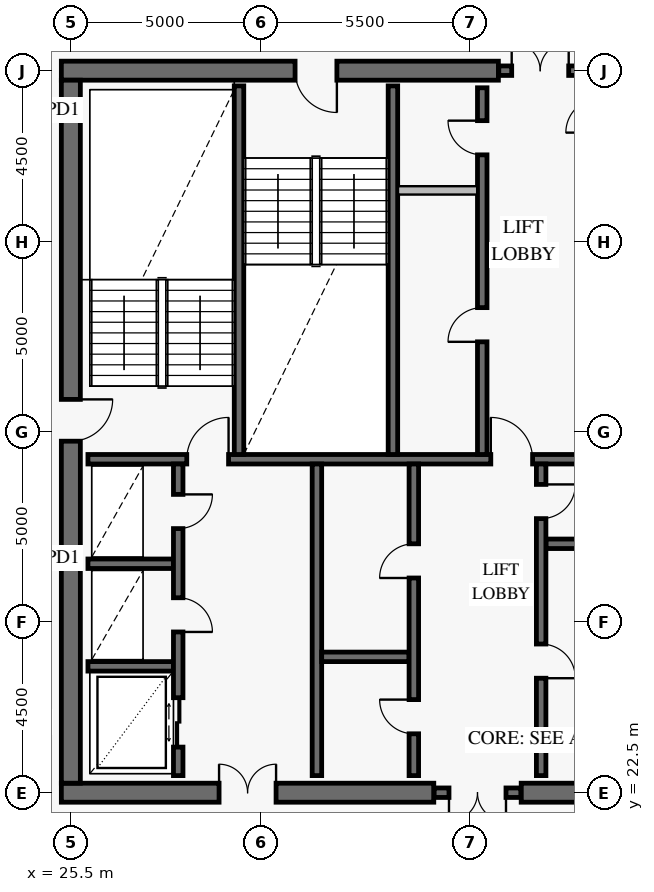
"""IFC4 building model, lengths in metres.
Left out: names, types, materials, properties, quantities, classifications, styles, units other than length and angle.
Written with IfcOpenShell. Run it as: python <this file> out.ifc"""

import sys

from ifc_helpers import new_model, si_unit, direction, frame, frame_2d, origin, place, context, subcontext, project, spatial, rectangle, extrude, element, fill, save


model = new_model("IFC4")
c1 = context("Model", 3, precision=1e-05, world=origin(), true_north=direction((0.0, 1.0)))
c2 = subcontext(c1, "Body", "Model", "MODEL_VIEW")
j1 = project(units=[si_unit("LENGTHUNIT", "METRE"), si_unit("PLANEANGLEUNIT", "RADIAN")], contexts=[c1])
p1 = place(None, origin())
s1 = spatial("IfcSite", under=j1, at=p1, CompositionType="ELEMENT")
p2 = place(p1, origin())
s2 = spatial("IfcBuilding", under=s1, at=p2, CompositionType="ELEMENT")
p3 = place(p2, frame((0.0, 0.0, 319.6)))
s3 = spatial("IfcBuildingStorey", under=s2, at=p3, CompositionType="ELEMENT", Elevation=319.6)
p4 = place(p3, frame((25.25, 22.5, 0.0), z_axis=(0.0, 0.0, 1.0), x_axis=(1.0, 0.0, 0.0)))
e1 = element("IfcWall", 1, at=p4, inside=s3, PredefinedType="SHEAR", context=c2, shape_type="SweptSolid", body=[
    extrude(rectangle(XDim=9.8, YDim=0.5, at=frame_2d((4.9, 0.0))), origin(), (0.0, 0.0, 1.0), 3.8),
])
p5 = place(p4, frame((4.15, 0.0, 0.0)))
e2 = element("IfcOpeningElement", 2, at=p5, cuts=e1, PredefinedType="OPENING", context=c2, shape_type="SweptSolid", body=[
    extrude(rectangle(XDim=1.5, YDim=2.15, at=frame_2d((0.75, 1.075))), frame((0.0, 0.262, 0.0), z_axis=(0.0, -1.0, 0.0), x_axis=(1.0, 0.0, 0.0)), (0.0, 0.0, 1.0), 0.524),
])
p6 = place(p3, frame((37.35, 22.5, 0.0), z_axis=(0.0, 0.0, 1.0), x_axis=(1.0, 0.0, 0.0)))
e3 = element("IfcWall", 3, at=p6, inside=s3, PredefinedType="SHEAR", context=c2, shape_type="SweptSolid", body=[
    extrude(rectangle(XDim=9.4, YDim=0.5, at=frame_2d((4.7, 0.0))), origin(), (0.0, 0.0, 1.0), 3.8),
])
p7 = place(p6, frame((3.95, 0.0, 0.0)))
e4 = element("IfcOpeningElement", 4, at=p7, cuts=e3, PredefinedType="OPENING", context=c2, shape_type="SweptSolid", body=[
    extrude(rectangle(XDim=1.5, YDim=2.15, at=frame_2d((0.75, 1.075))), frame((0.0, 0.262, 0.0), z_axis=(0.0, -1.0, 0.0), x_axis=(1.0, 0.0, 0.0)), (0.0, 0.0, 1.0), 0.524),
])
p8 = place(p3, frame((36.75, 41.5, 0.0), z_axis=(0.0, 0.0, 1.0), x_axis=(-1.0, 0.0, 0.0)))
e5 = element("IfcWall", 5, at=p8, inside=s3, PredefinedType="SHEAR", context=c2, shape_type="SweptSolid", body=[
    extrude(rectangle(XDim=11.5, YDim=0.5, at=frame_2d((5.75, 0.0))), origin(), (0.0, 0.0, 1.0), 3.8),
])
p9 = place(p8, frame((4.25, 0.0, 0.0)))
e6 = element("IfcOpeningElement", 6, at=p9, cuts=e5, PredefinedType="OPENING", context=c2, shape_type="SweptSolid", body=[
    extrude(rectangle(XDim=1.1, YDim=2.15, at=frame_2d((0.55, 1.075))), frame((0.0, 0.262, 0.0), z_axis=(0.0, -1.0, 0.0), x_axis=(1.0, 0.0, 0.0)), (0.0, 0.0, 1.0), 0.524),
])
p10 = place(p3, frame((25.5, 22.75, 0.0), z_axis=(0.0, 0.0, 1.0), x_axis=(0.0, 1.0, 0.0)))
e7 = element("IfcWall", 7, at=p10, inside=s3, PredefinedType="SHEAR", context=c2, shape_type="SweptSolid", body=[
    extrude(rectangle(XDim=18.5, YDim=0.5, at=frame_2d((9.25, 0.0))), origin(), (0.0, 0.0, 1.0), 3.8),
])
p11 = place(p10, frame((9.0, 0.0, 0.0)))
e8 = element("IfcOpeningElement", 8, at=p11, cuts=e7, PredefinedType="OPENING", context=c2, shape_type="SweptSolid", body=[
    extrude(rectangle(XDim=1.1, YDim=2.15, at=frame_2d((0.55, 1.075))), frame((0.0, 0.262, 0.0), z_axis=(0.0, -1.0, 0.0), x_axis=(1.0, 0.0, 0.0)), (0.0, 0.0, 1.0), 0.524),
])
p12 = place(p3, frame((35.06, 22.5, 0.0), z_axis=(0.0, 0.0, 1.0), x_axis=(1.0, 0.0, 0.0)))
e9 = element("IfcWall", 9, at=p12, inside=s3, PredefinedType="SOLIDWALL", context=c2, shape_type="SweptSolid", body=[
    extrude(rectangle(XDim=2.28, YDim=0.25, at=frame_2d((1.14, 0.0))), origin(), (0.0, 0.0, 1.0), 3.8),
])
p13 = place(p12, frame((0.39, 0.0, 0.0)))
e10 = element("IfcOpeningElement", 10, at=p13, cuts=e9, PredefinedType="OPENING", context=c2, shape_type="SweptSolid", body=[
    extrude(rectangle(XDim=1.5, YDim=2.15, at=frame_2d((0.75, 1.075))), frame((0.0, 0.137, 0.0), z_axis=(0.0, -1.0, 0.0), x_axis=(1.0, 0.0, 0.0)), (0.0, 0.0, 1.0), 0.274),
])
p14 = place(p3, frame((36.76, 41.5, 0.0), z_axis=(0.0, 0.0, 1.0), x_axis=(1.0, 0.0, 0.0)))
e11 = element("IfcWall", 11, at=p14, inside=s3, PredefinedType="SOLIDWALL", context=c2, shape_type="SweptSolid", body=[
    extrude(rectangle(XDim=2.18, YDim=0.25, at=frame_2d((1.09, 0.0))), origin(), (0.0, 0.0, 1.0), 3.8),
])
p15 = place(p14, frame((0.34, 0.0, 0.0)))
e12 = element("IfcOpeningElement", 12, at=p15, cuts=e11, PredefinedType="OPENING", context=c2, shape_type="SweptSolid", body=[
    extrude(rectangle(XDim=1.5, YDim=2.15, at=frame_2d((0.75, 1.075))), frame((0.0, 0.137, 0.0), z_axis=(0.0, -1.0, 0.0), x_axis=(1.0, 0.0, 0.0)), (0.0, 0.0, 1.0), 0.274),
])
p16 = place(p3, frame((25.95, 31.275, 0.0), z_axis=(0.0, 0.0, 1.0), x_axis=(1.0, 0.0, 0.0)))
e13 = element("IfcWall", 13, at=p16, inside=s3, PredefinedType="SOLIDWALL", context=c2, shape_type="SweptSolid", body=[
    extrude(rectangle(XDim=20.1, YDim=0.25, at=frame_2d((10.05, 0.0))), origin(), (0.0, 0.0, 1.0), 3.8),
])
p17 = place(p16, frame((2.6, 0.0, 0.0)))
e14 = element("IfcOpeningElement", 14, at=p17, cuts=e13, PredefinedType="OPENING", context=c2, shape_type="SweptSolid", body=[
    extrude(rectangle(XDim=1.1, YDim=2.15, at=frame_2d((0.55, 1.075))), frame((0.0, 0.137, 0.0), z_axis=(0.0, -1.0, 0.0), x_axis=(1.0, 0.0, 0.0)), (0.0, 0.0, 1.0), 0.274),
])
p18 = place(p16, frame((10.6, 0.0, 0.0)))
e15 = element("IfcOpeningElement", 15, at=p18, cuts=e13, PredefinedType="OPENING", context=c2, shape_type="SweptSolid", body=[
    extrude(rectangle(XDim=1.1, YDim=2.15, at=frame_2d((0.55, 1.075))), frame((0.0, 0.137, 0.0), z_axis=(0.0, -1.0, 0.0), x_axis=(1.0, 0.0, 0.0)), (0.0, 0.0, 1.0), 0.274),
])
p19 = place(p16, frame((16.35, 0.0, 0.0)))
e16 = element("IfcOpeningElement", 16, at=p19, cuts=e13, PredefinedType="OPENING", context=c2, shape_type="SweptSolid", body=[
    extrude(rectangle(XDim=1.1, YDim=2.15, at=frame_2d((0.55, 1.075))), frame((0.0, 0.137, 0.0), z_axis=(0.0, -1.0, 0.0), x_axis=(1.0, 0.0, 0.0)), (0.0, 0.0, 1.0), 0.274),
])
for number, where, z_axis, x_axis in (
    (17, (29.925, 31.4, 0.0), (0.0, 0.0, 1.0), (0.0, 1.0, 0.0)),
    (18, (33.975, 31.4, 0.0), (0.0, 0.0, 1.0), (0.0, 1.0, 0.0)),
):
    element("IfcWall", number, at=place(p3, frame(where, z_axis=z_axis, x_axis=x_axis)), inside=s3, PredefinedType="SOLIDWALL", context=c2, shape_type="SweptSolid", body=[
        extrude(rectangle(XDim=9.7, YDim=0.25, at=frame_2d((4.85, 0.0))), origin(), (0.0, 0.0, 1.0), 3.8),
    ])
p20 = place(p3, frame((36.325, 31.4, 0.0), z_axis=(0.0, 0.0, 1.0), x_axis=(0.0, 1.0, 0.0)))
e19 = element("IfcWall", 19, at=p20, inside=s3, PredefinedType="SOLIDWALL", context=c2, shape_type="SweptSolid", body=[
    extrude(rectangle(XDim=9.65, YDim=0.25, at=frame_2d((4.825, 0.0))), origin(), (0.0, 0.0, 1.0), 3.8),
])
p21 = place(p20, frame((2.965, 0.0, 0.0)))
e20 = element("IfcOpeningElement", 20, at=p21, cuts=e19, PredefinedType="OPENING", context=c2, shape_type="SweptSolid", body=[
    extrude(rectangle(XDim=0.9, YDim=2.1, at=frame_2d((0.45, 1.05))), frame((0.0, 0.137, 0.0), z_axis=(0.0, -1.0, 0.0), x_axis=(1.0, 0.0, 0.0)), (0.0, 0.0, 1.0), 0.274),
])
p22 = place(p20, frame((7.885, 0.0, 0.0)))
e21 = element("IfcOpeningElement", 21, at=p22, cuts=e19, PredefinedType="OPENING", context=c2, shape_type="SweptSolid", body=[
    extrude(rectangle(XDim=0.9, YDim=2.1, at=frame_2d((0.45, 1.05))), frame((0.0, 0.137, 0.0), z_axis=(0.0, -1.0, 0.0), x_axis=(1.0, 0.0, 0.0)), (0.0, 0.0, 1.0), 0.274),
])
for number, where, z_axis, x_axis in (
    (22, (25.95, 25.825, 0.0), (0.0, 0.0, 1.0), (1.0, 0.0, 0.0)),
    (23, (25.95, 28.525, 0.0), (0.0, 0.0, 1.0), (1.0, 0.0, 0.0)),
):
    element("IfcWall", number, at=place(p3, frame(where, z_axis=z_axis, x_axis=x_axis)), inside=s3, PredefinedType="SOLIDWALL", context=c2, shape_type="SweptSolid", body=[
        extrude(rectangle(XDim=2.25, YDim=0.25, at=frame_2d((1.125, 0.0))), origin(), (0.0, 0.0, 1.0), 3.8),
    ])
p23 = place(p3, frame((28.325, 22.95, 0.0), z_axis=(0.0, 0.0, 1.0), x_axis=(0.0, 1.0, 0.0)))
e24 = element("IfcWall", 24, at=p23, inside=s3, PredefinedType="SOLIDWALL", context=c2, shape_type="SweptSolid", body=[
    extrude(rectangle(XDim=8.2, YDim=0.25, at=frame_2d((4.1, 0.0))), origin(), (0.0, 0.0, 1.0), 3.8),
])
p24 = place(p23, frame((0.75, 0.0, 0.0)))
e25 = element("IfcOpeningElement", 25, at=p24, cuts=e24, PredefinedType="OPENING", context=c2, shape_type="SweptSolid", body=[
    extrude(rectangle(XDim=1.3, YDim=2.3, at=frame_2d((0.65, 1.15))), frame((0.0, 0.137, 0.0), z_axis=(0.0, -1.0, 0.0), x_axis=(1.0, 0.0, 0.0)), (0.0, 0.0, 1.0), 0.274),
])
p25 = place(p23, frame((3.78, 0.0, 0.0)))
e26 = element("IfcOpeningElement", 26, at=p25, cuts=e24, PredefinedType="OPENING", context=c2, shape_type="SweptSolid", body=[
    extrude(rectangle(XDim=0.9, YDim=2.1, at=frame_2d((0.45, 1.05))), frame((0.0, 0.137, 0.0), z_axis=(0.0, -1.0, 0.0), x_axis=(1.0, 0.0, 0.0)), (0.0, 0.0, 1.0), 0.274),
])
p26 = place(p23, frame((6.5, 0.0, 0.0)))
e27 = element("IfcOpeningElement", 27, at=p26, cuts=e24, PredefinedType="OPENING", context=c2, shape_type="SweptSolid", body=[
    extrude(rectangle(XDim=0.9, YDim=2.1, at=frame_2d((0.45, 1.05))), frame((0.0, 0.137, 0.0), z_axis=(0.0, -1.0, 0.0), x_axis=(1.0, 0.0, 0.0)), (0.0, 0.0, 1.0), 0.274),
])
p27 = place(p3, frame((31.975, 22.95, 0.0), z_axis=(0.0, 0.0, 1.0), x_axis=(0.0, 1.0, 0.0)))
e28 = element("IfcWall", 28, at=p27, inside=s3, PredefinedType="SOLIDWALL", context=c2, shape_type="SweptSolid", body=[
    extrude(rectangle(XDim=8.2, YDim=0.25, at=frame_2d((4.1, 0.0))), origin(), (0.0, 0.0, 1.0), 3.8),
])
p28 = place(p3, frame((32.1, 26.075, 0.0), z_axis=(0.0, 0.0, 1.0), x_axis=(1.0, 0.0, 0.0)))
e29 = element("IfcWall", 29, at=p28, inside=s3, PredefinedType="SOLIDWALL", context=c2, shape_type="SweptSolid", body=[
    extrude(rectangle(XDim=2.3, YDim=0.25, at=frame_2d((1.15, 0.0))), origin(), (0.0, 0.0, 1.0), 3.8),
])
p29 = place(p3, frame((34.525, 22.95, 0.0), z_axis=(0.0, 0.0, 1.0), x_axis=(0.0, 1.0, 0.0)))
e30 = element("IfcWall", 30, at=p29, inside=s3, PredefinedType="SOLIDWALL", context=c2, shape_type="SweptSolid", body=[
    extrude(rectangle(XDim=8.2, YDim=0.25, at=frame_2d((4.1, 0.0))), origin(), (0.0, 0.0, 1.0), 3.8),
])
p30 = place(p29, frame((1.1, 0.0, 0.0)))
e31 = element("IfcOpeningElement", 31, at=p30, cuts=e30, PredefinedType="OPENING", context=c2, shape_type="SweptSolid", body=[
    extrude(rectangle(XDim=0.9, YDim=2.1, at=frame_2d((0.45, 1.05))), frame((0.0, 0.137, 0.0), z_axis=(0.0, -1.0, 0.0), x_axis=(1.0, 0.0, 0.0)), (0.0, 0.0, 1.0), 0.274),
])
p31 = place(p29, frame((5.2, 0.0, 0.0)))
e32 = element("IfcOpeningElement", 32, at=p31, cuts=e30, PredefinedType="OPENING", context=c2, shape_type="SweptSolid", body=[
    extrude(rectangle(XDim=0.9, YDim=2.1, at=frame_2d((0.45, 1.05))), frame((0.0, 0.137, 0.0), z_axis=(0.0, -1.0, 0.0), x_axis=(1.0, 0.0, 0.0)), (0.0, 0.0, 1.0), 0.274),
])
p32 = place(p3, frame((38.0, 29.05, 0.0), z_axis=(0.0, 0.0, 1.0), x_axis=(1.0, 0.0, 0.0)))
e33 = element("IfcWall", 33, at=p32, inside=s3, PredefinedType="SOLIDWALL", context=c2, shape_type="SweptSolid", body=[
    extrude(rectangle(XDim=2.3, YDim=0.25, at=frame_2d((1.15, 0.0))), origin(), (0.0, 0.0, 1.0), 3.8),
])
p33 = place(p3, frame((37.875, 22.95, 0.0), z_axis=(0.0, 0.0, 1.0), x_axis=(0.0, 1.0, 0.0)))
e34 = element("IfcWall", 34, at=p33, inside=s3, PredefinedType="SOLIDWALL", context=c2, shape_type="SweptSolid", body=[
    extrude(rectangle(XDim=8.2, YDim=0.25, at=frame_2d((4.1, 0.0))), origin(), (0.0, 0.0, 1.0), 3.8),
])
p34 = place(p33, frame((2.562, 0.0, 0.0)))
e35 = element("IfcOpeningElement", 35, at=p34, cuts=e34, PredefinedType="OPENING", context=c2, shape_type="SweptSolid", body=[
    extrude(rectangle(XDim=0.9, YDim=2.1, at=frame_2d((0.45, 1.05))), frame((0.0, 0.137, 0.0), z_axis=(0.0, -1.0, 0.0), x_axis=(1.0, 0.0, 0.0)), (0.0, 0.0, 1.0), 0.274),
])
p35 = place(p33, frame((6.762, 0.0, 0.0)))
e36 = element("IfcOpeningElement", 36, at=p35, cuts=e34, PredefinedType="OPENING", context=c2, shape_type="SweptSolid", body=[
    extrude(rectangle(XDim=0.9, YDim=2.1, at=frame_2d((0.45, 1.05))), frame((0.0, 0.137, 0.0), z_axis=(0.0, -1.0, 0.0), x_axis=(1.0, 0.0, 0.0)), (0.0, 0.0, 1.0), 0.274),
])
p36 = place(p3, frame((34.108, 38.35, 0.0), z_axis=(0.0, 0.0, 1.0), x_axis=(1.0, 0.0, 0.0)))
e37 = element("IfcWall", 37, at=p36, inside=s3, PredefinedType="PARTITIONING", context=c2, shape_type="SweptSolid", body=[
    extrude(rectangle(XDim=2.084, YDim=0.22, at=frame_2d((1.042, 0.0))), origin(), (0.0, 0.0, 1.0), 3.55),
])
p37 = place(p11, frame((1.1, 0.0, 0.0), z_axis=(0.0, 0.0, 1.0), x_axis=(-1.0, 0.0, 0.0)))
e38 = element("IfcDoor", 38, at=p37, inside=s3, OperationType="SINGLE_SWING_LEFT", PredefinedType="USERDEFINED", context=c2, shape_type="SweptSolid", body=[
    extrude(rectangle(XDim=1.1, YDim=2.15, at=frame_2d((0.55, 1.075))), frame((0.0, 0.025, 0.0), z_axis=(0.0, -1.0, 0.0), x_axis=(1.0, 0.0, 0.0)), (0.0, 0.0, 1.0), 0.05),
])
fill(e8, e38)
p38 = place(p9, origin())
e39 = element("IfcDoor", 39, at=p38, inside=s3, OperationType="SINGLE_SWING_LEFT", PredefinedType="USERDEFINED", context=c2, shape_type="SweptSolid", body=[
    extrude(rectangle(XDim=1.1, YDim=2.15, at=frame_2d((0.55, 1.075))), frame((0.0, 0.025, 0.0), z_axis=(0.0, -1.0, 0.0), x_axis=(1.0, 0.0, 0.0)), (0.0, 0.0, 1.0), 0.05),
])
fill(e6, e39)
p39 = place(p5, origin())
e40 = element("IfcDoor", 40, at=p39, inside=s3, OperationType="DOUBLE_DOOR_SINGLE_SWING", PredefinedType="DOOR", context=c2, shape_type="SweptSolid", body=[
    extrude(rectangle(XDim=1.5, YDim=2.15, at=frame_2d((0.75, 1.075))), frame((0.0, 0.025, 0.0), z_axis=(0.0, -1.0, 0.0), x_axis=(1.0, 0.0, 0.0)), (0.0, 0.0, 1.0), 0.05),
])
fill(e2, e40)
p40 = place(p13, frame((1.5, 0.0, 0.0), z_axis=(0.0, 0.0, 1.0), x_axis=(-1.0, 0.0, 0.0)))
e41 = element("IfcDoor", 41, at=p40, inside=s3, OperationType="DOUBLE_DOOR_SINGLE_SWING", PredefinedType="DOOR", context=c2, shape_type="SweptSolid", body=[
    extrude(rectangle(XDim=1.5, YDim=2.15, at=frame_2d((0.75, 1.075))), frame((0.0, 0.025, 0.0), z_axis=(0.0, -1.0, 0.0), x_axis=(1.0, 0.0, 0.0)), (0.0, 0.0, 1.0), 0.05),
])
fill(e10, e41)
p41 = place(p15, origin())
e42 = element("IfcDoor", 42, at=p41, inside=s3, OperationType="DOUBLE_DOOR_SINGLE_SWING", PredefinedType="DOOR", context=c2, shape_type="SweptSolid", body=[
    extrude(rectangle(XDim=1.5, YDim=2.15, at=frame_2d((0.75, 1.075))), frame((0.0, 0.025, 0.0), z_axis=(0.0, -1.0, 0.0), x_axis=(1.0, 0.0, 0.0)), (0.0, 0.0, 1.0), 0.05),
])
fill(e12, e42)
p42 = place(p17, origin())
e43 = element("IfcDoor", 43, at=p42, inside=s3, OperationType="SINGLE_SWING_RIGHT", PredefinedType="USERDEFINED", context=c2, shape_type="SweptSolid", body=[
    extrude(rectangle(XDim=1.1, YDim=2.15, at=frame_2d((0.55, 1.075))), frame((0.0, 0.025, 0.0), z_axis=(0.0, -1.0, 0.0), x_axis=(1.0, 0.0, 0.0)), (0.0, 0.0, 1.0), 0.05),
])
fill(e14, e43)
p43 = place(p18, origin())
e44 = element("IfcDoor", 44, at=p43, inside=s3, OperationType="SINGLE_SWING_LEFT", PredefinedType="USERDEFINED", context=c2, shape_type="SweptSolid", body=[
    extrude(rectangle(XDim=1.1, YDim=2.15, at=frame_2d((0.55, 1.075))), frame((0.0, 0.025, 0.0), z_axis=(0.0, -1.0, 0.0), x_axis=(1.0, 0.0, 0.0)), (0.0, 0.0, 1.0), 0.05),
])
fill(e15, e44)
p44 = place(p21, origin())
e45 = element("IfcDoor", 45, at=p44, inside=s3, OperationType="SINGLE_SWING_LEFT", PredefinedType="DOOR", context=c2, shape_type="SweptSolid", body=[
    extrude(rectangle(XDim=0.9, YDim=2.1, at=frame_2d((0.45, 1.05))), frame((0.0, 0.025, 0.0), z_axis=(0.0, -1.0, 0.0), x_axis=(1.0, 0.0, 0.0)), (0.0, 0.0, 1.0), 0.05),
])
fill(e20, e45)
p45 = place(p22, origin())
e46 = element("IfcDoor", 46, at=p45, inside=s3, OperationType="SINGLE_SWING_RIGHT", PredefinedType="DOOR", context=c2, shape_type="SweptSolid", body=[
    extrude(rectangle(XDim=0.9, YDim=2.1, at=frame_2d((0.45, 1.05))), frame((0.0, 0.025, 0.0), z_axis=(0.0, -1.0, 0.0), x_axis=(1.0, 0.0, 0.0)), (0.0, 0.0, 1.0), 0.05),
])
fill(e21, e46)
p46 = place(p24, frame((1.3, 0.0, 0.0), z_axis=(0.0, 0.0, 1.0), x_axis=(-1.0, 0.0, 0.0)))
e47 = element("IfcDoor", 47, at=p46, inside=s3, OperationType="DOUBLE_DOOR_SLIDING", PredefinedType="DOOR", context=c2, shape_type="SweptSolid", body=[
    extrude(rectangle(XDim=1.3, YDim=2.3, at=frame_2d((0.65, 1.15))), frame((0.0, 0.025, 0.0), z_axis=(0.0, -1.0, 0.0), x_axis=(1.0, 0.0, 0.0)), (0.0, 0.0, 1.0), 0.05),
])
fill(e25, e47)
p47 = place(p25, frame((0.9, 0.0, 0.0), z_axis=(0.0, 0.0, 1.0), x_axis=(-1.0, 0.0, 0.0)))
e48 = element("IfcDoor", 48, at=p47, inside=s3, OperationType="SINGLE_SWING_RIGHT", PredefinedType="DOOR", context=c2, shape_type="SweptSolid", body=[
    extrude(rectangle(XDim=0.9, YDim=2.1, at=frame_2d((0.45, 1.05))), frame((0.0, 0.025, 0.0), z_axis=(0.0, -1.0, 0.0), x_axis=(1.0, 0.0, 0.0)), (0.0, 0.0, 1.0), 0.05),
])
fill(e26, e48)
p48 = place(p26, frame((0.9, 0.0, 0.0), z_axis=(0.0, 0.0, 1.0), x_axis=(-1.0, 0.0, 0.0)))
e49 = element("IfcDoor", 49, at=p48, inside=s3, OperationType="SINGLE_SWING_LEFT", PredefinedType="DOOR", context=c2, shape_type="SweptSolid", body=[
    extrude(rectangle(XDim=0.9, YDim=2.1, at=frame_2d((0.45, 1.05))), frame((0.0, 0.025, 0.0), z_axis=(0.0, -1.0, 0.0), x_axis=(1.0, 0.0, 0.0)), (0.0, 0.0, 1.0), 0.05),
])
fill(e27, e49)
p49 = place(p30, origin())
e50 = element("IfcDoor", 50, at=p49, inside=s3, OperationType="SINGLE_SWING_RIGHT", PredefinedType="DOOR", context=c2, shape_type="SweptSolid", body=[
    extrude(rectangle(XDim=0.9, YDim=2.1, at=frame_2d((0.45, 1.05))), frame((0.0, 0.025, 0.0), z_axis=(0.0, -1.0, 0.0), x_axis=(1.0, 0.0, 0.0)), (0.0, 0.0, 1.0), 0.05),
])
fill(e31, e50)
p50 = place(p31, origin())
e51 = element("IfcDoor", 51, at=p50, inside=s3, OperationType="SINGLE_SWING_LEFT", PredefinedType="DOOR", context=c2, shape_type="SweptSolid", body=[
    extrude(rectangle(XDim=0.9, YDim=2.1, at=frame_2d((0.45, 1.05))), frame((0.0, 0.025, 0.0), z_axis=(0.0, -1.0, 0.0), x_axis=(1.0, 0.0, 0.0)), (0.0, 0.0, 1.0), 0.05),
])
fill(e32, e51)
p51 = place(p34, frame((0.9, 0.0, 0.0), z_axis=(0.0, 0.0, 1.0), x_axis=(-1.0, 0.0, 0.0)))
e52 = element("IfcDoor", 52, at=p51, inside=s3, OperationType="SINGLE_SWING_RIGHT", PredefinedType="DOOR", context=c2, shape_type="SweptSolid", body=[
    extrude(rectangle(XDim=0.9, YDim=2.1, at=frame_2d((0.45, 1.05))), frame((0.0, 0.025, 0.0), z_axis=(0.0, -1.0, 0.0), x_axis=(1.0, 0.0, 0.0)), (0.0, 0.0, 1.0), 0.05),
])
fill(e35, e52)
p52 = place(p35, frame((0.9, 0.0, 0.0), z_axis=(0.0, 0.0, 1.0), x_axis=(-1.0, 0.0, 0.0)))
e53 = element("IfcDoor", 53, at=p52, inside=s3, OperationType="SINGLE_SWING_LEFT", PredefinedType="DOOR", context=c2, shape_type="SweptSolid", body=[
    extrude(rectangle(XDim=0.9, YDim=2.1, at=frame_2d((0.45, 1.05))), frame((0.0, 0.025, 0.0), z_axis=(0.0, -1.0, 0.0), x_axis=(1.0, 0.0, 0.0)), (0.0, 0.0, 1.0), 0.05),
])
fill(e36, e53)
save(model, sys.argv[1])
